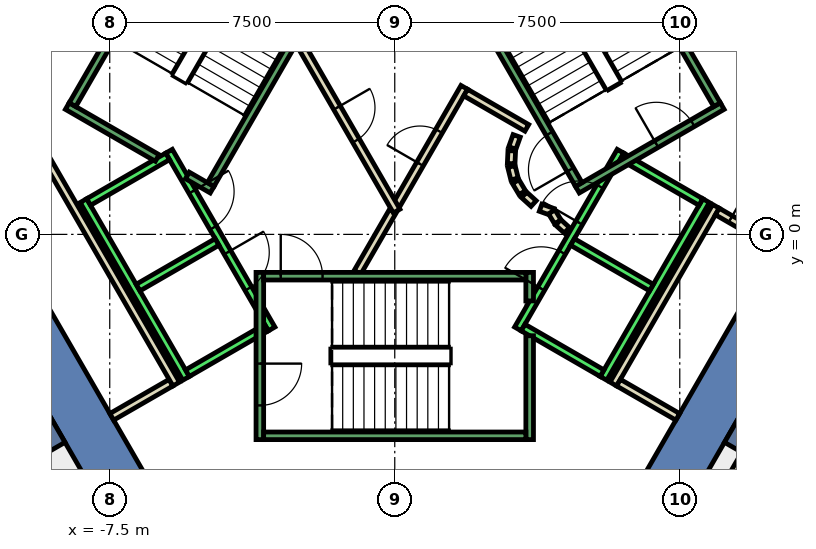
"""IFC4 building model, lengths in metres.
Left out: names, types, materials, properties, quantities, classifications, styles, units other than length and angle.
Written with IfcOpenShell. Run it as: python <this file> out.ifc"""

import sys

from ifc_helpers import new_model, si_unit, direction, frame, frame_2d, origin, place, context, subcontext, project, spatial, polyline, rectangle, outline, extrude, element, fill, save


model = new_model("IFC4")
c1 = context("Model", 3, precision=1e-05, world=origin(), true_north=direction((0.0, 1.0)))
c2 = subcontext(c1, "Body", "Model", "MODEL_VIEW")
j1 = project(units=[si_unit("LENGTHUNIT", "METRE"), si_unit("PLANEANGLEUNIT", "RADIAN")], contexts=[c1])
p1 = place(None, origin())
s1 = spatial("IfcSite", under=j1, at=p1, CompositionType="ELEMENT")
p2 = place(p1, origin())
s2 = spatial("IfcBuilding", under=s1, at=p2, CompositionType="ELEMENT")
p3 = place(p2, frame((0.0, 0.0, 231.8)))
s3 = spatial("IfcBuildingStorey", under=s2, at=p3, CompositionType="ELEMENT", Elevation=231.8)
p4 = place(p3, frame((0.0, 0.0, -0.4)))
e1 = element("IfcWall", 1, at=p4, inside=s3, PredefinedType="SHEAR", context=c2, shape_type="SweptSolid", body=[
    extrude(outline(polyline([(8.084, 11.498), (6.871, 10.798), (11.662, 2.5), (13.279, 2.5), (8.084, 11.498)])), origin(), (0.0, 0.0, 1.0), 4.0),
])
p5 = place(p3, frame((0.0, 0.0, -0.4)))
e2 = element("IfcWall", 2, at=p5, inside=s3, PredefinedType="SHEAR", context=c2, shape_type="SweptSolid", body=[
    extrude(outline(polyline([(-11.834, 5.002), (-10.622, 4.302), (-5.831, 12.6), (-6.64, 14.0), (-11.834, 5.002)])), origin(), (0.0, 0.0, 1.0), 4.0),
])
p6 = place(p3, frame((0.0, 0.0, -0.4)))
e3 = element("IfcWall", 3, at=p6, inside=s3, PredefinedType="SHEAR", context=c2, shape_type="SweptSolid", body=[
    extrude(outline(polyline([(-13.279, 2.5), (-6.64, -9.0), (-5.831, -7.6), (-11.662, 2.5), (-13.279, 2.5)])), origin(), (0.0, 0.0, 1.0), 4.0),
])
p7 = place(p3, frame((0.0, 0.0, -0.4)))
e4 = element("IfcWall", 4, at=p7, inside=s3, PredefinedType="SHEAR", context=c2, shape_type="SweptSolid", body=[
    extrude(outline(polyline([(6.64, -9.0), (13.279, 2.5), (11.662, 2.5), (5.831, -7.6), (6.64, -9.0)])), origin(), (0.0, 0.0, 1.0), 4.0),
])
for number, where, z_axis, x_axis in (
    (5, (8.877, -5.125, -0.4), (0.0, 0.0, 1.0), (0.866, -0.5, 0.0)),
    (6, (-8.877, -5.125, -0.4), (0.0, 0.0, 1.0), (-0.866, -0.5, 0.0)),
):
    element("IfcWall", number, at=place(p3, frame(where, z_axis=z_axis, x_axis=x_axis)), inside=s3, PredefinedType="SHEAR", context=c2, shape_type="SweptSolid", body=[
        extrude(rectangle(XDim=9.0, YDim=0.8, at=frame_2d((4.5, 0.0))), origin(), (0.0, 0.0, 1.0), 4.0),
    ])
p8 = place(p3, frame((5.751, -3.938, 0.0), z_axis=(0.0, 0.0, 1.0), x_axis=(0.500034260056, 0.866005622828, 0.0)))
e7 = element("IfcWall", 7, at=p8, inside=s3, PredefinedType="PARTITIONING", context=c2, shape_type="SweptSolid", body=[
    extrude(rectangle(XDim=5.399, YDim=0.2, at=frame_2d((2.7, 0.0))), origin(), (0.0, 0.0, 1.0), 3.6),
])
p9 = place(p3, frame((8.488, 0.602, 0.0), z_axis=(0.0, 0.0, 1.0), x_axis=(0.86585331735, -0.500297944063, 0.0)))
e8 = element("IfcWall", 8, at=p9, inside=s3, PredefinedType="PARTITIONING", context=c2, shape_type="SweptSolid", body=[
    extrude(rectangle(XDim=1.799, YDim=0.2, at=frame_2d((0.9, 0.0))), origin(), (0.0, 0.0, 1.0), 3.6),
])
p10 = place(p9, frame((0.4, 0.0, 0.0)))
e9 = element("IfcOpeningElement", 9, at=p10, cuts=e8, PredefinedType="OPENING", context=c2, shape_type="SweptSolid", body=[
    extrude(rectangle(XDim=0.9, YDim=2.1, at=frame_2d((0.45, 1.05))), frame((0.0, 0.11, 0.0), z_axis=(0.0, -1.0, 0.0), x_axis=(1.0, 0.0, 0.0)), (0.0, 0.0, 1.0), 0.22),
])
for number, where, z_axis, x_axis in (
    (10, (7.447, -4.801, 0.0), (0.0, 0.0, 1.0), (-0.866, 0.499, 0.0)),
    (11, (-5.888, -3.902, 0.0), (0.0, 0.0, 1.0), (-0.866, -0.499, 0.0)),
):
    element("IfcWall", number, at=place(p3, frame(where, z_axis=z_axis, x_axis=x_axis)), inside=s3, PredefinedType="PARTITIONING", context=c2, shape_type="SweptSolid", body=[
        extrude(rectangle(XDim=1.8, YDim=0.2, at=frame_2d((0.9, 0.0))), origin(), (0.0, 0.0, 1.0), 3.6),
    ])
p11 = place(p3, frame((-9.751, 2.99, 0.0), z_axis=(0.0, 0.0, 1.0), x_axis=(0.500012163284, -0.866018381195, 0.0)))
e12 = element("IfcWall", 12, at=p11, inside=s3, PredefinedType="PARTITIONING", context=c2, shape_type="SweptSolid", body=[
    extrude(rectangle(XDim=8.0, YDim=0.2, at=frame_2d((4.0, 0.0))), origin(), (0.0, 0.0, 1.0), 3.6),
])
p12 = place(p3, frame((7.283, -9.086, 0.0), z_axis=(0.0, 0.0, 1.0), x_axis=(0.500035303972, 0.866005020067, 0.0)))
e13 = element("IfcWall", 13, at=p12, inside=s3, PredefinedType="PARTITIONING", context=c2, shape_type="SweptSolid", body=[
    extrude(rectangle(XDim=3.828, YDim=0.15, at=frame_2d((1.914, 0.0))), origin(), (0.0, 0.0, 1.0), 3.6),
])
p13 = place(p3, frame((-0.982, -1.0, 0.0), z_axis=(0.0, 0.0, 1.0), x_axis=(0.50024047865, 0.865886518847, 0.0)))
e14 = element("IfcWall", 14, at=p13, inside=s3, PredefinedType="PARTITIONING", context=c2, shape_type="SweptSolid", body=[
    extrude(rectangle(XDim=1.863, YDim=0.2, at=frame_2d((0.931, 0.0))), origin(), (0.0, 0.0, 1.0), 3.6),
])
p14 = place(p3, frame((0.05, 0.787, 0.0), z_axis=(0.0, 0.0, 1.0), x_axis=(0.499954076797, 0.866051915934, 0.0)))
e15 = element("IfcWall", 15, at=p14, inside=s3, PredefinedType="PARTITIONING", context=c2, shape_type="SweptSolid", body=[
    extrude(rectangle(XDim=3.558, YDim=0.2, at=frame_2d((1.779, 0.0))), origin(), (0.0, 0.0, 1.0), 3.6),
])
p15 = place(p14, frame((1.229, 0.0, 0.0)))
e16 = element("IfcOpeningElement", 16, at=p15, cuts=e15, PredefinedType="OPENING", context=c2, shape_type="SweptSolid", body=[
    extrude(rectangle(XDim=1.0, YDim=2.1, at=frame_2d((0.5, 1.05))), frame((0.0, 0.11, 0.0), z_axis=(0.0, -1.0, 0.0), x_axis=(1.0, 0.0, 0.0)), (0.0, 0.0, 1.0), 0.22),
])
p16 = place(p3, frame((1.866, 3.732, 0.0), z_axis=(0.0, 0.0, 1.0), x_axis=(0.866043361281, -0.499968895414, 0.0)))
e17 = element("IfcWall", 17, at=p16, inside=s3, PredefinedType="PARTITIONING", context=c2, shape_type="SweptSolid", body=[
    extrude(rectangle(XDim=1.858, YDim=0.2, at=frame_2d((0.929, 0.0))), origin(), (0.0, 0.0, 1.0), 3.6),
])
p17 = place(p3, frame((3.208, 2.592, 0.0), z_axis=(0.0, 0.0, 1.0), x_axis=(-0.337388820924, -0.941365382578, 0.0)))
e18 = element("IfcWall", 18, at=p17, inside=s3, PredefinedType="PARTITIONING", context=c2, shape_type="SweptSolid", body=[
    extrude(rectangle(XDim=0.338, YDim=0.2, at=frame_2d((0.169, 0.0))), origin(), (0.0, 0.0, 1.0), 3.6),
])
p18 = place(p3, frame((3.079, 2.199, 0.0), z_axis=(0.0, 0.0, 1.0), x_axis=(-0.047771483479, -0.998858290933, 0.0)))
e19 = element("IfcWall", 19, at=p18, inside=s3, PredefinedType="PARTITIONING", context=c2, shape_type="SweptSolid", body=[
    extrude(rectangle(XDim=0.337, YDim=0.2, at=frame_2d((0.169, 0.0))), origin(), (0.0, 0.0, 1.0), 3.6),
])
p19 = place(p3, frame((3.07, 1.786, 0.0), z_axis=(0.0, 0.0, 1.0), x_axis=(0.242705583207, -0.970099994784, 0.0)))
e20 = element("IfcWall", 20, at=p19, inside=s3, PredefinedType="PARTITIONING", context=c2, shape_type="SweptSolid", body=[
    extrude(rectangle(XDim=0.338, YDim=0.2, at=frame_2d((0.169, 0.0))), origin(), (0.0, 0.0, 1.0), 3.6),
])
for number, where, z_axis, x_axis in (
    (21, (3.182, 1.388, 0.0), (0.0, 0.0, 1.0), (0.512, -0.859, 0.0)),
    (22, (3.404, 1.039, 0.0), (0.0, 0.0, 1.0), (0.74, -0.672, 0.0)),
):
    element("IfcWall", number, at=place(p3, frame(where, z_axis=z_axis, x_axis=x_axis)), inside=s3, PredefinedType="PARTITIONING", context=c2, shape_type="SweptSolid", body=[
        extrude(rectangle(XDim=0.338, YDim=0.2, at=frame_2d((0.169, 0.0))), origin(), (0.0, 0.0, 1.0), 3.6),
    ])
p20 = place(p3, frame((3.838, 0.702, 0.0), z_axis=(0.0, 0.0, 1.0), x_axis=(0.941035081519, -0.338308993895, 0.0)))
e23 = element("IfcWall", 23, at=p20, inside=s3, PredefinedType="PARTITIONING", context=c2, shape_type="SweptSolid", body=[
    extrude(rectangle(XDim=0.337, YDim=0.2, at=frame_2d((0.168, 0.0))), origin(), (0.0, 0.0, 1.0), 3.6),
])
p21 = place(p3, frame((4.132, 0.593, 0.0), z_axis=(0.0, 0.0, 1.0), x_axis=(0.513561617048, -0.858052717201, 0.0)))
e24 = element("IfcWall", 24, at=p21, inside=s3, PredefinedType="PARTITIONING", context=c2, shape_type="SweptSolid", body=[
    extrude(rectangle(XDim=0.308, YDim=0.2, at=frame_2d((0.154, 0.0))), origin(), (0.0, 0.0, 1.0), 3.6),
])
p22 = place(p3, frame((4.301, 0.315, 0.0), z_axis=(0.0, 0.0, 1.0), x_axis=(0.741798017506, -0.670623367639, 0.0)))
e25 = element("IfcWall", 25, at=p22, inside=s3, PredefinedType="PARTITIONING", context=c2, shape_type="SweptSolid", body=[
    extrude(rectangle(XDim=0.309, YDim=0.2, at=frame_2d((0.154, 0.0))), origin(), (0.0, 0.0, 1.0), 3.6),
])
p23 = place(p3, frame((-2.54, 5.1, 0.0), z_axis=(0.0, 0.0, 1.0), x_axis=(0.499925051871, -0.866068670783, 0.0)))
e26 = element("IfcWall", 26, at=p23, inside=s3, PredefinedType="PARTITIONING", context=c2, shape_type="SweptSolid", body=[
    extrude(rectangle(XDim=5.181, YDim=0.2, at=frame_2d((2.59, 0.0))), origin(), (0.0, 0.0, 1.0), 3.6),
])
p24 = place(p23, frame((2.04, 0.0, 0.0)))
e27 = element("IfcOpeningElement", 27, at=p24, cuts=e26, PredefinedType="OPENING", context=c2, shape_type="SweptSolid", body=[
    extrude(rectangle(XDim=1.0, YDim=2.1, at=frame_2d((0.5, 1.05))), frame((0.0, 0.11, 0.0), z_axis=(0.0, -1.0, 0.0), x_axis=(1.0, 0.0, 0.0)), (0.0, 0.0, 1.0), 0.22),
])
p25 = place(p3, frame((-5.94, 2.188, 0.0), z_axis=(0.0, 0.0, 1.0), x_axis=(0.500034260056, -0.866005622828, 0.0)))
e28 = element("IfcWall", 28, at=p25, inside=s3, PredefinedType="STANDARD", context=c2, shape_type="SweptSolid", body=[
    extrude(rectangle(XDim=5.399, YDim=0.2, at=frame_2d((2.7, 0.0))), origin(), (0.0, 0.0, 1.0), 3.6),
])
p26 = place(p25, frame((3.075, 0.0, 0.0)))
e29 = element("IfcOpeningElement", 29, at=p26, cuts=e28, PredefinedType="OPENING", context=c2, shape_type="SweptSolid", body=[
    extrude(rectangle(XDim=1.1, YDim=2.1, at=frame_2d((0.55, 1.05))), frame((0.0, 0.11, 0.0), z_axis=(0.0, -1.0, 0.0), x_axis=(1.0, 0.0, 0.0)), (0.0, 0.0, 1.0), 0.22),
])
p27 = place(p25, frame((1.225, 0.0, 0.0)))
e30 = element("IfcOpeningElement", 30, at=p27, cuts=e28, PredefinedType="OPENING", context=c2, shape_type="SweptSolid", body=[
    extrude(rectangle(XDim=1.1, YDim=2.1, at=frame_2d((0.55, 1.05))), frame((0.0, 0.11, 0.0), z_axis=(0.0, -1.0, 0.0), x_axis=(1.0, 0.0, 0.0)), (0.0, 0.0, 1.0), 0.22),
])
p28 = place(p3, frame((-8.192, 0.888, 0.0), z_axis=(0.0, 0.0, 1.0), x_axis=(0.500034260056, -0.866005622828, 0.0)))
e31 = element("IfcWall", 31, at=p28, inside=s3, PredefinedType="STANDARD", context=c2, shape_type="SweptSolid", body=[
    extrude(rectangle(XDim=5.399, YDim=0.2, at=frame_2d((2.7, 0.0))), origin(), (0.0, 0.0, 1.0), 3.6),
])
for number, where, z_axis, x_axis in (
    (32, (-5.977, 2.052, 0.0), (0.0, 0.0, 1.0), (-0.866, -0.5, 0.0)),
    (33, (-4.677, -0.2, 0.0), (0.0, 0.0, 1.0), (-0.866, -0.5, 0.0)),
):
    element("IfcWall", number, at=place(p3, frame(where, z_axis=z_axis, x_axis=x_axis)), inside=s3, PredefinedType="STANDARD", context=c2, shape_type="SweptSolid", body=[
        extrude(rectangle(XDim=2.399, YDim=0.2, at=frame_2d((1.2, 0.0))), origin(), (0.0, 0.0, 1.0), 3.6),
    ])
p29 = place(p3, frame((-3.377, -2.452, 0.0), z_axis=(0.0, 0.0, 1.0), x_axis=(-0.865955154139, -0.50012165622, 0.0)))
e34 = element("IfcWall", 34, at=p29, inside=s3, PredefinedType="STANDARD", context=c2, shape_type="SweptSolid", body=[
    extrude(rectangle(XDim=2.4, YDim=0.2, at=frame_2d((1.2, 0.0))), origin(), (0.0, 0.0, 1.0), 3.6),
])
p30 = place(p3, frame((3.24, -2.488, 0.0), z_axis=(0.0, 0.0, 1.0), x_axis=(0.500034260056, 0.866005622828, 0.0)))
e35 = element("IfcWall", 35, at=p30, inside=s3, PredefinedType="STANDARD", context=c2, shape_type="SweptSolid", body=[
    extrude(rectangle(XDim=5.399, YDim=0.2, at=frame_2d((2.7, 0.0))), origin(), (0.0, 0.0, 1.0), 3.6),
])
p31 = place(p30, frame((3.225, 0.0, 0.0)))
e36 = element("IfcOpeningElement", 36, at=p31, cuts=e35, PredefinedType="OPENING", context=c2, shape_type="SweptSolid", body=[
    extrude(rectangle(XDim=1.1, YDim=2.1, at=frame_2d((0.55, 1.05))), frame((0.0, 0.11, 0.0), z_axis=(0.0, -1.0, 0.0), x_axis=(1.0, 0.0, 0.0)), (0.0, 0.0, 1.0), 0.22),
])
p32 = place(p30, frame((1.225, 0.0, 0.0)))
e37 = element("IfcOpeningElement", 37, at=p32, cuts=e35, PredefinedType="OPENING", context=c2, shape_type="SweptSolid", body=[
    extrude(rectangle(XDim=1.1, YDim=2.1, at=frame_2d((0.55, 1.05))), frame((0.0, 0.11, 0.0), z_axis=(0.0, -1.0, 0.0), x_axis=(1.0, 0.0, 0.0)), (0.0, 0.0, 1.0), 0.22),
])
p33 = place(p3, frame((5.492, -3.788, 0.0), z_axis=(0.0, 0.0, 1.0), x_axis=(0.500034260056, 0.866005622828, 0.0)))
e38 = element("IfcWall", 38, at=p33, inside=s3, PredefinedType="STANDARD", context=c2, shape_type="SweptSolid", body=[
    extrude(rectangle(XDim=5.399, YDim=0.2, at=frame_2d((2.7, 0.0))), origin(), (0.0, 0.0, 1.0), 3.6),
])
p34 = place(p3, frame((3.377, -2.452, 0.0), z_axis=(0.0, 0.0, 1.0), x_axis=(0.865955154139, -0.50012165622, 0.0)))
e39 = element("IfcWall", 39, at=p34, inside=s3, PredefinedType="STANDARD", context=c2, shape_type="SweptSolid", body=[
    extrude(rectangle(XDim=2.4, YDim=0.2, at=frame_2d((1.2, 0.0))), origin(), (0.0, 0.0, 1.0), 3.6),
])
for number, where, z_axis, x_axis in (
    (40, (4.677, -0.2, 0.0), (0.0, 0.0, 1.0), (0.866, -0.5, 0.0)),
    (41, (5.977, 2.052, 0.0), (0.0, 0.0, 1.0), (0.866, -0.5, 0.0)),
):
    element("IfcWall", number, at=place(p3, frame(where, z_axis=z_axis, x_axis=x_axis)), inside=s3, PredefinedType="STANDARD", context=c2, shape_type="SweptSolid", body=[
        extrude(rectangle(XDim=2.399, YDim=0.2, at=frame_2d((1.2, 0.0))), origin(), (0.0, 0.0, 1.0), 3.6),
    ])
p35 = place(p3, frame((-3.55, -1.0, 0.0), z_axis=(0.0, 0.0, 1.0), x_axis=(0.0, -1.0, 0.0)))
e42 = element("IfcWall", 42, at=p35, inside=s3, PredefinedType="STANDARD", context=c2, shape_type="SweptSolid", body=[
    extrude(rectangle(XDim=4.4, YDim=0.2, at=frame_2d((2.2, 0.0))), origin(), (0.0, 0.0, 1.0), 3.6),
])
p36 = place(p35, frame((2.4, 0.0, 0.0)))
e43 = element("IfcOpeningElement", 43, at=p36, cuts=e42, PredefinedType="OPENING", context=c2, shape_type="SweptSolid", body=[
    extrude(rectangle(XDim=1.1, YDim=2.2, at=frame_2d((0.55, 1.1))), frame((0.0, 0.11, 0.0), z_axis=(0.0, -1.0, 0.0), x_axis=(1.0, 0.0, 0.0)), (0.0, 0.0, 1.0), 0.22),
])
p37 = place(p3, frame((3.55, -2.667, 0.0), z_axis=(0.0, 0.0, 1.0), x_axis=(0.0, -1.0, 0.0)))
e44 = element("IfcWall", 44, at=p37, inside=s3, PredefinedType="STANDARD", context=c2, shape_type="SweptSolid", body=[
    extrude(rectangle(XDim=2.733, YDim=0.2, at=frame_2d((1.366, 0.0))), origin(), (0.0, 0.0, 1.0), 3.6),
])
p38 = place(p3, frame((3.55, -1.0, 0.0), z_axis=(0.0, 0.0, 1.0), x_axis=(0.0, -1.0, 0.0)))
e45 = element("IfcWall", 45, at=p38, inside=s3, PredefinedType="STANDARD", context=c2, shape_type="SweptSolid", body=[
    extrude(rectangle(XDim=0.751, YDim=0.2, at=frame_2d((0.375, 0.0))), origin(), (0.0, 0.0, 1.0), 3.6),
])
p39 = place(p3, frame((-3.45, -1.1, 0.0), z_axis=(0.0, 0.0, 1.0), x_axis=(1.0, 0.0, 0.0)))
e46 = element("IfcWall", 46, at=p39, inside=s3, PredefinedType="STANDARD", context=c2, shape_type="SweptSolid", body=[
    extrude(rectangle(XDim=6.9, YDim=0.2, at=frame_2d((3.45, 0.0))), origin(), (0.0, 0.0, 1.0), 3.6),
])
p40 = place(p39, frame((0.45, 0.0, 0.0)))
e47 = element("IfcOpeningElement", 47, at=p40, cuts=e46, PredefinedType="OPENING", context=c2, shape_type="SweptSolid", body=[
    extrude(rectangle(XDim=1.1, YDim=2.2, at=frame_2d((0.55, 1.1))), frame((0.0, 0.11, 0.0), z_axis=(0.0, -1.0, 0.0), x_axis=(1.0, 0.0, 0.0)), (0.0, 0.0, 1.0), 0.22),
])
p41 = place(p3, frame((-3.45, -5.3, 0.0), z_axis=(0.0, 0.0, 1.0), x_axis=(1.0, 0.0, 0.0)))
e48 = element("IfcWall", 48, at=p41, inside=s3, PredefinedType="STANDARD", context=c2, shape_type="SweptSolid", body=[
    extrude(rectangle(XDim=6.9, YDim=0.2, at=frame_2d((3.45, 0.0))), origin(), (0.0, 0.0, 1.0), 3.6),
])
p42 = place(p3, frame((4.806, 1.176, 0.0), z_axis=(0.0, 0.0, 1.0), x_axis=(0.866059941101, 0.499940174841, 0.0)))
e49 = element("IfcWall", 49, at=p42, inside=s3, PredefinedType="STANDARD", context=c2, shape_type="SweptSolid", body=[
    extrude(rectangle(XDim=4.4, YDim=0.2, at=frame_2d((2.2, 0.0))), origin(), (0.0, 0.0, 1.0), 3.6),
])
p43 = place(p42, frame((2.4, 0.0, 0.0)))
e50 = element("IfcOpeningElement", 50, at=p43, cuts=e49, PredefinedType="OPENING", context=c2, shape_type="SweptSolid", body=[
    extrude(rectangle(XDim=1.1, YDim=2.2, at=frame_2d((0.55, 1.1))), frame((0.0, 0.11, 0.0), z_axis=(0.0, -1.0, 0.0), x_axis=(1.0, 0.0, 0.0)), (0.0, 0.0, 1.0), 0.22),
])
p44 = place(p3, frame((4.843, 1.312, 0.0), z_axis=(0.0, 0.0, 1.0), x_axis=(-0.499963383562, 0.866046543262, 0.0)))
e51 = element("IfcWall", 51, at=p44, inside=s3, PredefinedType="STANDARD", context=c2, shape_type="SweptSolid", body=[
    extrude(rectangle(XDim=6.9, YDim=0.2, at=frame_2d((3.45, 0.0))), origin(), (0.0, 0.0, 1.0), 3.6),
])
p45 = place(p44, frame((0.45, 0.0, 0.0)))
e52 = element("IfcOpeningElement", 52, at=p45, cuts=e51, PredefinedType="OPENING", context=c2, shape_type="SweptSolid", body=[
    extrude(rectangle(XDim=1.1, YDim=2.2, at=frame_2d((0.55, 1.1))), frame((0.0, 0.11, 0.0), z_axis=(0.0, -1.0, 0.0), x_axis=(1.0, 0.0, 0.0)), (0.0, 0.0, 1.0), 0.22),
])
p46 = place(p3, frame((8.48, 3.412, 0.0), z_axis=(0.0, 0.0, 1.0), x_axis=(-0.499978703459, 0.866037698999, 0.0)))
e53 = element("IfcWall", 53, at=p46, inside=s3, PredefinedType="STANDARD", context=c2, shape_type="SweptSolid", body=[
    extrude(rectangle(XDim=6.9, YDim=0.2, at=frame_2d((3.45, 0.0))), origin(), (0.0, 0.0, 1.0), 3.6),
])
p47 = place(p3, frame((-6.25, 2.01, 0.0), z_axis=(0.0, 0.0, 1.0), x_axis=(-0.86611865017, 0.499838457731, 0.0)))
e54 = element("IfcWall", 54, at=p47, inside=s3, PredefinedType="STANDARD", context=c2, shape_type="SweptSolid", body=[
    extrude(rectangle(XDim=2.733, YDim=0.2, at=frame_2d((1.366, 0.0))), origin(), (0.0, 0.0, 1.0), 3.6),
])
p48 = place(p3, frame((-4.806, 1.176, 0.0), z_axis=(0.0, 0.0, 1.0), x_axis=(-0.866558586415, 0.499075361355, 0.0)))
e55 = element("IfcWall", 55, at=p48, inside=s3, PredefinedType="STANDARD", context=c2, shape_type="SweptSolid", body=[
    extrude(rectangle(XDim=0.751, YDim=0.2, at=frame_2d((0.376, 0.0))), origin(), (0.0, 0.0, 1.0), 3.6),
])
p49 = place(p3, frame((-1.393, 7.288, 0.0), z_axis=(0.0, 0.0, 1.0), x_axis=(-0.499963383562, -0.866046543262, 0.0)))
e56 = element("IfcWall", 56, at=p49, inside=s3, PredefinedType="STANDARD", context=c2, shape_type="SweptSolid", body=[
    extrude(rectangle(XDim=6.9, YDim=0.2, at=frame_2d((3.45, 0.0))), origin(), (0.0, 0.0, 1.0), 3.6),
])
p50 = place(p49, frame((0.45, 0.0, 0.0)))
e57 = element("IfcOpeningElement", 57, at=p50, cuts=e56, PredefinedType="OPENING", context=c2, shape_type="SweptSolid", body=[
    extrude(rectangle(XDim=1.1, YDim=2.2, at=frame_2d((0.55, 1.1))), frame((0.0, 0.11, 0.0), z_axis=(0.0, -1.0, 0.0), x_axis=(1.0, 0.0, 0.0)), (0.0, 0.0, 1.0), 0.22),
])
p51 = place(p3, frame((-5.03, 9.388, 0.0), z_axis=(0.0, 0.0, 1.0), x_axis=(-0.499978703459, -0.866037698999, 0.0)))
e58 = element("IfcWall", 58, at=p51, inside=s3, PredefinedType="STANDARD", context=c2, shape_type="SweptSolid", body=[
    extrude(rectangle(XDim=6.9, YDim=0.2, at=frame_2d((3.45, 0.0))), origin(), (0.0, 0.0, 1.0), 3.6),
])
p52 = place(p15, origin())
e59 = element("IfcDoor", 59, at=p52, inside=s3, OperationType="SINGLE_SWING_RIGHT", PredefinedType="DOOR", context=c2, shape_type="SweptSolid", body=[
    extrude(rectangle(XDim=1.0, YDim=2.1, at=frame_2d((0.5, 1.05))), frame((0.0, 0.025, 0.0), z_axis=(0.0, -1.0, 0.0), x_axis=(1.0, 0.0, 0.0)), (0.0, 0.0, 1.0), 0.05),
])
fill(e16, e59)
p53 = place(p24, origin())
e60 = element("IfcDoor", 60, at=p53, inside=s3, OperationType="SINGLE_SWING_RIGHT", PredefinedType="DOOR", context=c2, shape_type="SweptSolid", body=[
    extrude(rectangle(XDim=1.0, YDim=2.1, at=frame_2d((0.5, 1.05))), frame((0.0, 0.025, 0.0), z_axis=(0.0, -1.0, 0.0), x_axis=(1.0, 0.0, 0.0)), (0.0, 0.0, 1.0), 0.05),
])
fill(e27, e60)
p54 = place(p10, origin())
e61 = element("IfcDoor", 61, at=p54, inside=s3, OperationType="SINGLE_SWING_RIGHT", PredefinedType="DOOR", context=c2, shape_type="SweptSolid", body=[
    extrude(rectangle(XDim=0.9, YDim=2.1, at=frame_2d((0.45, 1.05))), frame((0.0, 0.025, 0.0), z_axis=(0.0, -1.0, 0.0), x_axis=(1.0, 0.0, 0.0)), (0.0, 0.0, 1.0), 0.05),
])
fill(e9, e61)
p55 = place(p31, origin())
e62 = element("IfcDoor", 62, at=p55, inside=s3, OperationType="SLIDING_TO_LEFT", PredefinedType="DOOR", context=c2, shape_type="SweptSolid", body=[
    extrude(rectangle(XDim=1.1, YDim=2.1, at=frame_2d((0.55, 1.05))), frame((0.0, 0.025, 0.0), z_axis=(0.0, -1.0, 0.0), x_axis=(1.0, 0.0, 0.0)), (0.0, 0.0, 1.0), 0.05),
])
fill(e36, e62)
p56 = place(p26, origin())
e63 = element("IfcDoor", 63, at=p56, inside=s3, OperationType="SLIDING_TO_LEFT", PredefinedType="DOOR", context=c2, shape_type="SweptSolid", body=[
    extrude(rectangle(XDim=1.1, YDim=2.1, at=frame_2d((0.55, 1.05))), frame((0.0, 0.025, 0.0), z_axis=(0.0, -1.0, 0.0), x_axis=(1.0, 0.0, 0.0)), (0.0, 0.0, 1.0), 0.05),
])
fill(e29, e63)
p57 = place(p32, origin())
e64 = element("IfcDoor", 64, at=p57, inside=s3, OperationType="SLIDING_TO_LEFT", PredefinedType="DOOR", context=c2, shape_type="SweptSolid", body=[
    extrude(rectangle(XDim=1.1, YDim=2.1, at=frame_2d((0.55, 1.05))), frame((0.0, 0.025, 0.0), z_axis=(0.0, -1.0, 0.0), x_axis=(1.0, 0.0, 0.0)), (0.0, 0.0, 1.0), 0.05),
])
fill(e37, e64)
p58 = place(p27, origin())
e65 = element("IfcDoor", 65, at=p58, inside=s3, OperationType="SLIDING_TO_LEFT", PredefinedType="DOOR", context=c2, shape_type="SweptSolid", body=[
    extrude(rectangle(XDim=1.1, YDim=2.1, at=frame_2d((0.55, 1.05))), frame((0.0, 0.025, 0.0), z_axis=(0.0, -1.0, 0.0), x_axis=(1.0, 0.0, 0.0)), (0.0, 0.0, 1.0), 0.05),
])
fill(e30, e65)
p59 = place(p40, origin())
e66 = element("IfcDoor", 66, at=p59, inside=s3, OperationType="SINGLE_SWING_LEFT", PredefinedType="DOOR", context=c2, shape_type="SweptSolid", body=[
    extrude(rectangle(XDim=1.1, YDim=2.2, at=frame_2d((0.55, 1.1))), frame((0.0, 0.025, 0.0), z_axis=(0.0, -1.0, 0.0), x_axis=(1.0, 0.0, 0.0)), (0.0, 0.0, 1.0), 0.05),
])
fill(e47, e66)
p60 = place(p36, origin())
e67 = element("IfcDoor", 67, at=p60, inside=s3, OperationType="SINGLE_SWING_LEFT", PredefinedType="DOOR", context=c2, shape_type="SweptSolid", body=[
    extrude(rectangle(XDim=1.1, YDim=2.2, at=frame_2d((0.55, 1.1))), frame((0.0, 0.025, 0.0), z_axis=(0.0, -1.0, 0.0), x_axis=(1.0, 0.0, 0.0)), (0.0, 0.0, 1.0), 0.05),
])
fill(e43, e67)
p61 = place(p45, origin())
e68 = element("IfcDoor", 68, at=p61, inside=s3, OperationType="SINGLE_SWING_LEFT", PredefinedType="DOOR", context=c2, shape_type="SweptSolid", body=[
    extrude(rectangle(XDim=1.1, YDim=2.2, at=frame_2d((0.55, 1.1))), frame((0.0, 0.025, 0.0), z_axis=(0.0, -1.0, 0.0), x_axis=(1.0, 0.0, 0.0)), (0.0, 0.0, 1.0), 0.05),
])
fill(e52, e68)
p62 = place(p43, origin())
e69 = element("IfcDoor", 69, at=p62, inside=s3, OperationType="SINGLE_SWING_LEFT", PredefinedType="DOOR", context=c2, shape_type="SweptSolid", body=[
    extrude(rectangle(XDim=1.1, YDim=2.2, at=frame_2d((0.55, 1.1))), frame((0.0, 0.025, 0.0), z_axis=(0.0, -1.0, 0.0), x_axis=(1.0, 0.0, 0.0)), (0.0, 0.0, 1.0), 0.05),
])
fill(e50, e69)
save(model, sys.argv[1])
